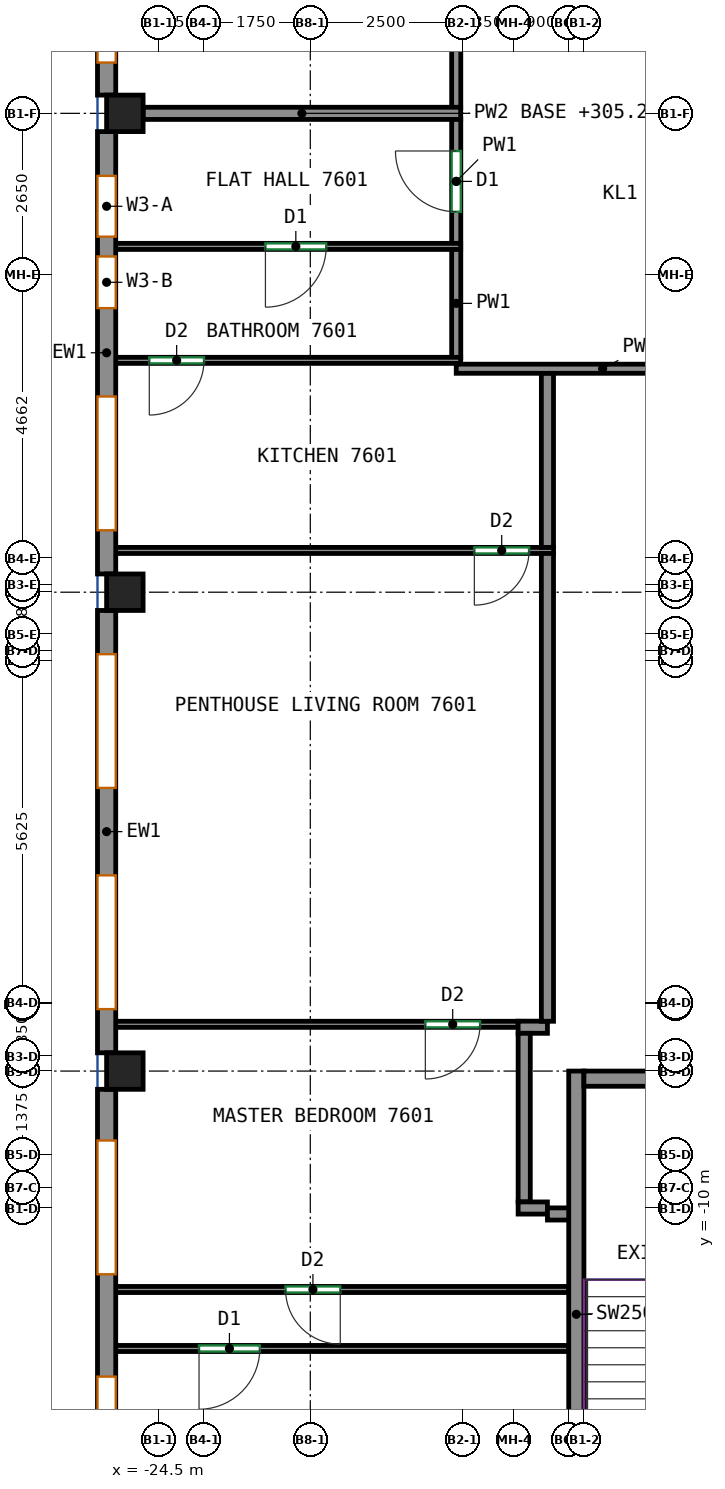
"""IFC4 building model, lengths in metres.
Left out: names, types, materials, properties, quantities, classifications, styles, units other than length and angle.
Written with IfcOpenShell. Run it as: python <this file> out.ifc"""

import sys

from ifc_helpers import new_model, si_unit, direction, frame, frame_2d, origin, origin_2d, place, context, subcontext, project, spatial, rectangle, extrude, source, transform, mapped, element, fill, save


model = new_model("IFC4")
c1 = context("Model", 3, precision=1e-05, world=origin(), true_north=direction((0.0, 1.0)))
c2 = subcontext(c1, "Body", "Model", "MODEL_VIEW")
j1 = project(units=[si_unit("LENGTHUNIT", "METRE"), si_unit("PLANEANGLEUNIT", "RADIAN")], contexts=[c1])
p1 = place(None, origin())
s1 = spatial("IfcSite", under=j1, at=p1, CompositionType="ELEMENT")
p2 = place(p1, origin())
s2 = spatial("IfcBuilding", under=s1, at=p2, CompositionType="ELEMENT")
p3 = place(p2, frame((0.0, 0.0, 305.2)))
s3 = spatial("IfcBuildingStorey", under=s2, at=p3, CompositionType="ELEMENT", Elevation=305.2)
m1 = source(origin(), c2, "Body", "SweptSolid", [
    extrude(rectangle(XDim=0.6, YDim=0.6, at=origin_2d()), origin(), (0.0, 0.0, 1.0), 3.12),
])
for number, where, z_axis, x_axis in (
    (1, (-25.05, -7.75, 0.0), (0.0, 0.0, 1.0), (1.0, 0.0, 0.0)),
    (2, (-25.05, 0.125, 0.0), (0.0, 0.0, 1.0), (1.0, 0.0, 0.0)),
    (3, (-25.05, 8.0, 0.0), (0.0, 0.0, 1.0), (1.0, 0.0, 0.0)),
):
    element("IfcColumn", number, at=place(p3, frame(where, z_axis=z_axis, x_axis=x_axis)), inside=s3, PredefinedType="COLUMN", context=c2, shape_type="MappedRepresentation", body=[
        mapped(m1, transform((0.0, 0.0, 0.0))),
    ])
m2 = source(origin(), c2, "Body", "SweptSolid", [
    extrude(rectangle(XDim=8.0, YDim=0.25, at=frame_2d((4.0, 0.0))), origin(), (0.0, 0.0, 1.0), 3.12),
])
p4 = place(p3, frame((-17.625, -15.75, 0.0), z_axis=(0.0, 0.0, 1.0), x_axis=(0.0, 1.0, 0.0)))
e4 = element("IfcWall", 4, at=p4, inside=s3, PredefinedType="SHEAR", context=c2, shape_type="MappedRepresentation", body=[
    mapped(m2, transform((0.0, 0.0, 0.0))),
])
m3 = source(origin(), c2, "Body", "SweptSolid", [
    extrude(rectangle(XDim=3.7, YDim=0.25, at=frame_2d((1.85, 0.0))), origin(), (0.0, 0.0, 1.0), 3.12),
])
p5 = place(p3, frame((-17.5, -7.875, 0.0), z_axis=(0.0, 0.0, 1.0), x_axis=(1.0, 0.0, 0.0)))
e5 = element("IfcWall", 5, at=p5, inside=s3, PredefinedType="SHEAR", context=c2, shape_type="MappedRepresentation", body=[
    mapped(m3, transform((0.0, 0.0, 0.0))),
])
m4 = source(origin(), c2, "Body", "SweptSolid", [
    extrude(rectangle(XDim=13.082, YDim=0.3, at=frame_2d((6.541, 0.0))), origin(), (0.0, 0.0, 1.0), 3.12),
])
p6 = place(p3, frame((-25.35, 21.382, 0.0), z_axis=(0.0, 0.0, 1.0), x_axis=(0.0, -1.0, 0.0)))
e6 = element("IfcWall", 6, at=p6, inside=s3, PredefinedType="SOLIDWALL", context=c2, shape_type="MappedRepresentation", body=[
    mapped(m4, transform((0.0, 0.0, 0.0))),
])
p7 = place(p6, frame((0.535, 0.0, 0.8)))
e7 = element("IfcOpeningElement", 7, at=p7, cuts=e6, PredefinedType="OPENING", context=c2, shape_type="SweptSolid", body=[
    extrude(rectangle(XDim=2.2, YDim=2.05, at=frame_2d((1.1, 1.025))), frame((0.0, 0.16, 0.0), z_axis=(0.0, -1.0, 0.0), x_axis=(1.0, 0.0, 0.0)), (0.0, 0.0, 1.0), 0.32),
])
p8 = place(p6, frame((3.806, 0.0, 0.8)))
e8 = element("IfcOpeningElement", 8, at=p8, cuts=e6, PredefinedType="OPENING", context=c2, shape_type="SweptSolid", body=[
    extrude(rectangle(XDim=2.2, YDim=2.05, at=frame_2d((1.1, 1.025))), frame((0.0, 0.16, 0.0), z_axis=(0.0, -1.0, 0.0), x_axis=(1.0, 0.0, 0.0)), (0.0, 0.0, 1.0), 0.32),
])
p9 = place(p6, frame((7.076, 0.0, 0.8)))
e9 = element("IfcOpeningElement", 9, at=p9, cuts=e6, PredefinedType="OPENING", context=c2, shape_type="SweptSolid", body=[
    extrude(rectangle(XDim=2.2, YDim=2.05, at=frame_2d((1.1, 1.025))), frame((0.0, 0.16, 0.0), z_axis=(0.0, -1.0, 0.0), x_axis=(1.0, 0.0, 0.0)), (0.0, 0.0, 1.0), 0.32),
])
p10 = place(p6, frame((10.347, 0.0, 0.8)))
e10 = element("IfcOpeningElement", 10, at=p10, cuts=e6, PredefinedType="OPENING", context=c2, shape_type="SweptSolid", body=[
    extrude(rectangle(XDim=2.2, YDim=2.05, at=frame_2d((1.1, 1.025))), frame((0.0, 0.16, 0.0), z_axis=(0.0, -1.0, 0.0), x_axis=(1.0, 0.0, 0.0)), (0.0, 0.0, 1.0), 0.32),
])
m5 = source(origin(), c2, "Body", "SweptSolid", [
    extrude(rectangle(XDim=7.275, YDim=0.3, at=frame_2d((3.637, 0.0))), origin(), (0.0, 0.0, 1.0), 3.12),
])
p11 = place(p3, frame((-25.35, 7.7, 0.0), z_axis=(0.0, 0.0, 1.0), x_axis=(0.0, -1.0, 0.0)))
e11 = element("IfcWall", 11, at=p11, inside=s3, PredefinedType="SOLIDWALL", context=c2, shape_type="MappedRepresentation", body=[
    mapped(m5, transform((0.0, 0.0, 0.0))),
])
p12 = place(p11, frame((0.728, 0.0, 0.8)))
e12 = element("IfcOpeningElement", 12, at=p12, cuts=e11, PredefinedType="OPENING", context=c2, shape_type="SweptSolid", body=[
    extrude(rectangle(XDim=1.0, YDim=2.05, at=frame_2d((0.5, 1.025))), frame((0.0, 0.16, 0.0), z_axis=(0.0, -1.0, 0.0), x_axis=(1.0, 0.0, 0.0)), (0.0, 0.0, 1.0), 0.32),
])
p13 = place(p11, frame((4.356, 0.0, 0.8)))
e13 = element("IfcOpeningElement", 13, at=p13, cuts=e11, PredefinedType="OPENING", context=c2, shape_type="SweptSolid", body=[
    extrude(rectangle(XDim=2.2, YDim=2.05, at=frame_2d((1.1, 1.025))), frame((0.0, 0.16, 0.0), z_axis=(0.0, -1.0, 0.0), x_axis=(1.0, 0.0, 0.0)), (0.0, 0.0, 1.0), 0.32),
])
p14 = place(p11, frame((2.053, 0.0, 0.8)))
e14 = element("IfcOpeningElement", 14, at=p14, cuts=e11, PredefinedType="OPENING", context=c2, shape_type="SweptSolid", body=[
    extrude(rectangle(XDim=0.85, YDim=2.05, at=frame_2d((0.425, 1.025))), frame((0.0, 0.16, 0.0), z_axis=(0.0, -1.0, 0.0), x_axis=(1.0, 0.0, 0.0)), (0.0, 0.0, 1.0), 0.32),
])
p15 = place(p3, frame((-25.35, -0.175, 0.0), z_axis=(0.0, 0.0, 1.0), x_axis=(0.0, -1.0, 0.0)))
e15 = element("IfcWall", 15, at=p15, inside=s3, PredefinedType="SOLIDWALL", context=c2, shape_type="MappedRepresentation", body=[
    mapped(m5, transform((0.0, 0.0, 0.0))),
])
p16 = place(p15, frame((0.719, 0.0, 0.8)))
e16 = element("IfcOpeningElement", 16, at=p16, cuts=e15, PredefinedType="OPENING", context=c2, shape_type="SweptSolid", body=[
    extrude(rectangle(XDim=2.2, YDim=2.05, at=frame_2d((1.1, 1.025))), frame((0.0, 0.16, 0.0), z_axis=(0.0, -1.0, 0.0), x_axis=(1.0, 0.0, 0.0)), (0.0, 0.0, 1.0), 0.32),
])
p17 = place(p15, frame((4.356, 0.0, 0.8)))
e17 = element("IfcOpeningElement", 17, at=p17, cuts=e15, PredefinedType="OPENING", context=c2, shape_type="SweptSolid", body=[
    extrude(rectangle(XDim=2.2, YDim=2.05, at=frame_2d((1.1, 1.025))), frame((0.0, 0.16, 0.0), z_axis=(0.0, -1.0, 0.0), x_axis=(1.0, 0.0, 0.0)), (0.0, 0.0, 1.0), 0.32),
])
m6 = source(origin(), c2, "Body", "SweptSolid", [
    extrude(rectangle(XDim=11.65, YDim=0.3, at=frame_2d((5.825, 0.0))), origin(), (0.0, 0.0, 1.0), 3.12),
])
p18 = place(p3, frame((-25.35, -8.05, 0.0), z_axis=(0.0, 0.0, 1.0), x_axis=(0.0, -1.0, 0.0)))
e18 = element("IfcWall", 18, at=p18, inside=s3, PredefinedType="SOLIDWALL", context=c2, shape_type="MappedRepresentation", body=[
    mapped(m6, transform((0.0, 0.0, 0.0))),
])
p19 = place(p18, frame((0.842, 0.0, 0.8)))
e19 = element("IfcOpeningElement", 19, at=p19, cuts=e18, PredefinedType="OPENING", context=c2, shape_type="SweptSolid", body=[
    extrude(rectangle(XDim=2.2, YDim=2.05, at=frame_2d((1.1, 1.025))), frame((0.0, 0.16, 0.0), z_axis=(0.0, -1.0, 0.0), x_axis=(1.0, 0.0, 0.0)), (0.0, 0.0, 1.0), 0.32),
])
p20 = place(p18, frame((4.725, 0.0, 0.8)))
e20 = element("IfcOpeningElement", 20, at=p20, cuts=e18, PredefinedType="OPENING", context=c2, shape_type="SweptSolid", body=[
    extrude(rectangle(XDim=2.2, YDim=2.05, at=frame_2d((1.1, 1.025))), frame((0.0, 0.16, 0.0), z_axis=(0.0, -1.0, 0.0), x_axis=(1.0, 0.0, 0.0)), (0.0, 0.0, 1.0), 0.32),
])
p21 = place(p18, frame((8.608, 0.0, 0.8)))
e21 = element("IfcOpeningElement", 21, at=p21, cuts=e18, PredefinedType="OPENING", context=c2, shape_type="SweptSolid", body=[
    extrude(rectangle(XDim=2.2, YDim=2.05, at=frame_2d((1.1, 1.025))), frame((0.0, 0.16, 0.0), z_axis=(0.0, -1.0, 0.0), x_axis=(1.0, 0.0, 0.0)), (0.0, 0.0, 1.0), 0.32),
])
p22 = place(p3, frame((-19.6, 3.8, 0.0), z_axis=(0.0, 0.0, 1.0), x_axis=(1.0, 0.0, 0.0)))
e22 = element("IfcWall", 22, at=p22, inside=s3, PredefinedType="PARTITIONING", context=c2, shape_type="SweptSolid", body=[
    extrude(rectangle(XDim=4.815, YDim=0.15, at=frame_2d((2.408, 0.0))), origin(), (0.0, 0.0, 1.0), 3.12),
])
p23 = place(p3, frame((-19.6, 3.978, 0.0), z_axis=(0.0, 0.0, 1.0), x_axis=(0.0, 1.0, 0.0)))
e23 = element("IfcWall", 23, at=p23, inside=s3, PredefinedType="PARTITIONING", context=c2, shape_type="SweptSolid", body=[
    extrude(rectangle(XDim=1.794, YDim=0.15, at=frame_2d((0.897, 0.0))), origin(), (0.0, 0.0, 1.0), 3.12),
])
p24 = place(p3, frame((-19.6, 5.852, 0.0), z_axis=(0.0, 0.0, 1.0), x_axis=(0.0, 1.0, 0.0)))
e24 = element("IfcWall", 24, at=p24, inside=s3, PredefinedType="PARTITIONING", context=c2, shape_type="SweptSolid", body=[
    extrude(rectangle(XDim=2.058, YDim=0.15, at=frame_2d((1.029, 0.0))), origin(), (0.0, 0.0, 1.0), 3.12),
])
p25 = place(p24, frame((0.529, 0.0, 0.0)))
e25 = element("IfcOpeningElement", 25, at=p25, cuts=e24, PredefinedType="OPENING", context=c2, shape_type="SweptSolid", body=[
    extrude(rectangle(XDim=1.0, YDim=2.1, at=frame_2d((0.5, 1.05))), frame((0.0, 0.085, 0.0), z_axis=(0.0, -1.0, 0.0), x_axis=(1.0, 0.0, 0.0)), (0.0, 0.0, 1.0), 0.17),
])
p26 = place(p3, frame((-19.6, 8.09, 0.0), z_axis=(0.0, 0.0, 1.0), x_axis=(0.0, 1.0, 0.0)))
e26 = element("IfcWall", 26, at=p26, inside=s3, PredefinedType="PARTITIONING", context=c2, shape_type="SweptSolid", body=[
    extrude(rectangle(XDim=15.635, YDim=0.15, at=frame_2d((7.817, 0.0))), origin(), (0.0, 0.0, 1.0), 3.12),
])
p27 = place(p3, frame((-17.75, -12.312, 0.0), z_axis=(0.0, 0.0, 1.0), x_axis=(-1.0, 0.0, 0.0)))
e27 = element("IfcWall", 27, at=p27, inside=s3, PredefinedType="PARTITIONING", context=c2, shape_type="SweptSolid", body=[
    extrude(rectangle(XDim=7.5, YDim=0.1, at=frame_2d((3.75, 0.0))), origin(), (0.0, 0.0, 1.0), 3.12),
])
p28 = place(p27, frame((5.08, 0.0, 0.0)))
e28 = element("IfcOpeningElement", 28, at=p28, cuts=e27, PredefinedType="OPENING", context=c2, shape_type="SweptSolid", body=[
    extrude(rectangle(XDim=1.0, YDim=2.1, at=frame_2d((0.5, 1.05))), frame((0.0, 0.06, 0.0), z_axis=(0.0, -1.0, 0.0), x_axis=(1.0, 0.0, 0.0)), (0.0, 0.0, 1.0), 0.12),
])
p29 = place(p3, frame((-17.75, -11.342, 0.0), z_axis=(0.0, 0.0, 1.0), x_axis=(-1.0, 0.0, 0.0)))
e29 = element("IfcWall", 29, at=p29, inside=s3, PredefinedType="PARTITIONING", context=c2, shape_type="SweptSolid", body=[
    extrude(rectangle(XDim=7.5, YDim=0.1, at=frame_2d((3.75, 0.0))), origin(), (0.0, 0.0, 1.0), 3.12),
])
p30 = place(p29, frame((3.757, 0.0, 0.0)))
e30 = element("IfcOpeningElement", 30, at=p30, cuts=e29, PredefinedType="OPENING", context=c2, shape_type="SweptSolid", body=[
    extrude(rectangle(XDim=0.9, YDim=2.1, at=frame_2d((0.45, 1.05))), frame((0.0, 0.06, 0.0), z_axis=(0.0, -1.0, 0.0), x_axis=(1.0, 0.0, 0.0)), (0.0, 0.0, 1.0), 0.12),
])
p31 = place(p3, frame((-18.582, -6.981, 0.0), z_axis=(0.0, 0.0, 1.0), x_axis=(-1.0, 0.0, 0.0)))
e31 = element("IfcWall", 31, at=p31, inside=s3, PredefinedType="PARTITIONING", context=c2, shape_type="SweptSolid", body=[
    extrude(rectangle(XDim=6.668, YDim=0.1, at=frame_2d((3.334, 0.0))), origin(), (0.0, 0.0, 1.0), 3.12),
])
p32 = place(p31, frame((0.626, 0.0, 0.0)))
e32 = element("IfcOpeningElement", 32, at=p32, cuts=e31, PredefinedType="OPENING", context=c2, shape_type="SweptSolid", body=[
    extrude(rectangle(XDim=0.9, YDim=2.1, at=frame_2d((0.45, 1.05))), frame((0.0, 0.06, 0.0), z_axis=(0.0, -1.0, 0.0), x_axis=(1.0, 0.0, 0.0)), (0.0, 0.0, 1.0), 0.12),
])
p33 = place(p3, frame((-18.582, -7.029, 0.0), z_axis=(0.0, 0.0, 1.0), x_axis=(1.0, 0.0, 0.0)))
e33 = element("IfcWall", 33, at=p33, inside=s3, PredefinedType="PARTITIONING", context=c2, shape_type="SweptSolid", body=[
    extrude(rectangle(XDim=0.482, YDim=0.2, at=frame_2d((0.241, 0.0))), origin(), (0.0, 0.0, 1.0), 3.12),
])
p34 = place(p3, frame((-18.482, -9.902, 0.0), z_axis=(0.0, 0.0, 1.0), x_axis=(0.0, 1.0, 0.0)))
e34 = element("IfcWall", 34, at=p34, inside=s3, PredefinedType="PARTITIONING", context=c2, shape_type="SweptSolid", body=[
    extrude(rectangle(XDim=2.773, YDim=0.2, at=frame_2d((1.387, 0.0))), origin(), (0.0, 0.0, 1.0), 3.12),
])
p35 = place(p3, frame((-18.1, -10.002, 0.0), z_axis=(0.0, 0.0, 1.0), x_axis=(-1.0, 0.0, 0.0)))
e35 = element("IfcWall", 35, at=p35, inside=s3, PredefinedType="PARTITIONING", context=c2, shape_type="SweptSolid", body=[
    extrude(rectangle(XDim=0.482, YDim=0.2, at=frame_2d((0.241, 0.0))), origin(), (0.0, 0.0, 1.0), 3.12),
])
p36 = place(p3, frame((-17.7, -10.1, 0.0), z_axis=(0.0, 0.0, 1.0), x_axis=(-1.0, 0.0, 0.0)))
e36 = element("IfcWall", 36, at=p36, inside=s3, PredefinedType="PARTITIONING", context=c2, shape_type="SweptSolid", body=[
    extrude(rectangle(XDim=0.4, YDim=0.2, at=frame_2d((0.2, 0.0))), origin(), (0.0, 0.0, 1.0), 3.12),
])
p37 = place(p3, frame((-18.0, 0.812, 0.0), z_axis=(0.0, 0.0, 1.0), x_axis=(-1.0, 0.0, 0.0)))
e37 = element("IfcWall", 37, at=p37, inside=s3, PredefinedType="PARTITIONING", context=c2, shape_type="SweptSolid", body=[
    extrude(rectangle(XDim=7.25, YDim=0.1, at=frame_2d((3.625, 0.0))), origin(), (0.0, 0.0, 1.0), 3.12),
])
p38 = place(p37, frame((0.402, 0.0, 0.0)))
e38 = element("IfcOpeningElement", 38, at=p38, cuts=e37, PredefinedType="OPENING", context=c2, shape_type="SweptSolid", body=[
    extrude(rectangle(XDim=0.9, YDim=2.1, at=frame_2d((0.45, 1.05))), frame((0.0, 0.06, 0.0), z_axis=(0.0, -1.0, 0.0), x_axis=(1.0, 0.0, 0.0)), (0.0, 0.0, 1.0), 0.12),
])
p39 = place(p3, frame((-18.1, -6.931, 0.0), z_axis=(0.0, 0.0, 1.0), x_axis=(0.0, 1.0, 0.0)))
e39 = element("IfcWall", 39, at=p39, inside=s3, PredefinedType="PARTITIONING", context=c2, shape_type="SweptSolid", body=[
    extrude(rectangle(XDim=7.693, YDim=0.2, at=frame_2d((3.846, 0.0))), origin(), (0.0, 0.0, 1.0), 3.12),
])
p40 = place(p3, frame((-19.527, 3.938, 0.0), z_axis=(0.0, 0.0, 1.0), x_axis=(-1.0, 0.0, 0.0)))
e40 = element("IfcWall", 40, at=p40, inside=s3, PredefinedType="PARTITIONING", context=c2, shape_type="SweptSolid", body=[
    extrude(rectangle(XDim=5.723, YDim=0.1, at=frame_2d((2.861, 0.0))), origin(), (0.0, 0.0, 1.0), 3.12),
])
p41 = place(p40, frame((4.221, 0.0, 0.0)))
e41 = element("IfcOpeningElement", 41, at=p41, cuts=e40, PredefinedType="OPENING", context=c2, shape_type="SweptSolid", body=[
    extrude(rectangle(XDim=0.9, YDim=2.1, at=frame_2d((0.45, 1.05))), frame((0.0, 0.06, 0.0), z_axis=(0.0, -1.0, 0.0), x_axis=(1.0, 0.0, 0.0)), (0.0, 0.0, 1.0), 0.12),
])
p42 = place(p3, frame((-18.1, 0.862, 0.0), z_axis=(0.0, 0.0, 1.0), x_axis=(0.0, 1.0, 0.0)))
e42 = element("IfcWall", 42, at=p42, inside=s3, PredefinedType="PARTITIONING", context=c2, shape_type="SweptSolid", body=[
    extrude(rectangle(XDim=2.861, YDim=0.2, at=frame_2d((1.43, 0.0))), origin(), (0.0, 0.0, 1.0), 3.12),
])
p43 = place(p3, frame((-19.527, 5.812, 0.0), z_axis=(0.0, 0.0, 1.0), x_axis=(-1.0, 0.0, 0.0)))
e43 = element("IfcWall", 43, at=p43, inside=s3, PredefinedType="PARTITIONING", context=c2, shape_type="SweptSolid", body=[
    extrude(rectangle(XDim=5.723, YDim=0.1, at=frame_2d((2.861, 0.0))), origin(), (0.0, 0.0, 1.0), 3.12),
])
p44 = place(p43, frame((2.211, 0.0, 0.0)))
e44 = element("IfcOpeningElement", 44, at=p44, cuts=e43, PredefinedType="OPENING", context=c2, shape_type="SweptSolid", body=[
    extrude(rectangle(XDim=1.0, YDim=2.1, at=frame_2d((0.5, 1.05))), frame((0.0, 0.06, 0.0), z_axis=(0.0, -1.0, 0.0), x_axis=(1.0, 0.0, 0.0)), (0.0, 0.0, 1.0), 0.12),
])
p45 = place(p3, frame((-19.527, 8.0, 0.0), z_axis=(0.0, 0.0, 1.0), x_axis=(-1.0, 0.0, 0.0)))
e45 = element("IfcWall", 45, at=p45, inside=s3, PredefinedType="PARTITIONING", context=c2, shape_type="SweptSolid", body=[
    extrude(rectangle(XDim=5.223, YDim=0.2, at=frame_2d((2.611, 0.0))), origin(), (0.0, 0.0, 1.0), 2.57),
])
p46 = place(p10, origin())
e46 = element("IfcWindow", 46, at=p46, inside=s3, PartitioningType="SINGLE_PANEL", PredefinedType="WINDOW", context=c2, shape_type="SweptSolid", body=[
    extrude(rectangle(XDim=2.2, YDim=2.05, at=frame_2d((1.1, 1.025))), frame((0.0, 0.03, 0.0), z_axis=(0.0, -1.0, 0.0), x_axis=(1.0, 0.0, 0.0)), (0.0, 0.0, 1.0), 0.06),
])
fill(e10, e46)
p47 = place(p12, origin())
e47 = element("IfcWindow", 47, at=p47, inside=s3, PartitioningType="SINGLE_PANEL", PredefinedType="WINDOW", context=c2, shape_type="SweptSolid", body=[
    extrude(rectangle(XDim=1.0, YDim=2.05, at=frame_2d((0.5, 1.025))), frame((0.0, 0.03, 0.0), z_axis=(0.0, -1.0, 0.0), x_axis=(1.0, 0.0, 0.0)), (0.0, 0.0, 1.0), 0.06),
])
fill(e12, e47)
p48 = place(p13, origin())
e48 = element("IfcWindow", 48, at=p48, inside=s3, PartitioningType="SINGLE_PANEL", PredefinedType="WINDOW", context=c2, shape_type="SweptSolid", body=[
    extrude(rectangle(XDim=2.2, YDim=2.05, at=frame_2d((1.1, 1.025))), frame((0.0, 0.03, 0.0), z_axis=(0.0, -1.0, 0.0), x_axis=(1.0, 0.0, 0.0)), (0.0, 0.0, 1.0), 0.06),
])
fill(e13, e48)
p49 = place(p16, origin())
e49 = element("IfcWindow", 49, at=p49, inside=s3, PartitioningType="SINGLE_PANEL", PredefinedType="WINDOW", context=c2, shape_type="SweptSolid", body=[
    extrude(rectangle(XDim=2.2, YDim=2.05, at=frame_2d((1.1, 1.025))), frame((0.0, 0.03, 0.0), z_axis=(0.0, -1.0, 0.0), x_axis=(1.0, 0.0, 0.0)), (0.0, 0.0, 1.0), 0.06),
])
fill(e16, e49)
p50 = place(p17, origin())
e50 = element("IfcWindow", 50, at=p50, inside=s3, PartitioningType="SINGLE_PANEL", PredefinedType="WINDOW", context=c2, shape_type="SweptSolid", body=[
    extrude(rectangle(XDim=2.2, YDim=2.05, at=frame_2d((1.1, 1.025))), frame((0.0, 0.03, 0.0), z_axis=(0.0, -1.0, 0.0), x_axis=(1.0, 0.0, 0.0)), (0.0, 0.0, 1.0), 0.06),
])
fill(e17, e50)
p51 = place(p19, origin())
e51 = element("IfcWindow", 51, at=p51, inside=s3, PartitioningType="SINGLE_PANEL", PredefinedType="WINDOW", context=c2, shape_type="SweptSolid", body=[
    extrude(rectangle(XDim=2.2, YDim=2.05, at=frame_2d((1.1, 1.025))), frame((0.0, 0.03, 0.0), z_axis=(0.0, -1.0, 0.0), x_axis=(1.0, 0.0, 0.0)), (0.0, 0.0, 1.0), 0.06),
])
fill(e19, e51)
p52 = place(p20, origin())
e52 = element("IfcWindow", 52, at=p52, inside=s3, PartitioningType="SINGLE_PANEL", PredefinedType="WINDOW", context=c2, shape_type="SweptSolid", body=[
    extrude(rectangle(XDim=2.2, YDim=2.05, at=frame_2d((1.1, 1.025))), frame((0.0, 0.03, 0.0), z_axis=(0.0, -1.0, 0.0), x_axis=(1.0, 0.0, 0.0)), (0.0, 0.0, 1.0), 0.06),
])
fill(e20, e52)
p53 = place(p28, origin())
e53 = element("IfcDoor", 53, at=p53, inside=s3, OperationType="SINGLE_SWING_RIGHT", PredefinedType="DOOR", context=c2, shape_type="SweptSolid", body=[
    extrude(rectangle(XDim=1.0, YDim=2.1, at=frame_2d((0.5, 1.05))), frame((0.0, 0.025, 0.0), z_axis=(0.0, -1.0, 0.0), x_axis=(1.0, 0.0, 0.0)), (0.0, 0.0, 1.0), 0.05),
])
fill(e28, e53)
p54 = place(p30, origin())
e54 = element("IfcDoor", 54, at=p54, inside=s3, OperationType="SINGLE_SWING_LEFT", PredefinedType="DOOR", context=c2, shape_type="SweptSolid", body=[
    extrude(rectangle(XDim=0.9, YDim=2.1, at=frame_2d((0.45, 1.05))), frame((0.0, 0.025, 0.0), z_axis=(0.0, -1.0, 0.0), x_axis=(1.0, 0.0, 0.0)), (0.0, 0.0, 1.0), 0.05),
])
fill(e30, e54)
p55 = place(p32, origin())
e55 = element("IfcDoor", 55, at=p55, inside=s3, OperationType="SINGLE_SWING_RIGHT", PredefinedType="DOOR", context=c2, shape_type="SweptSolid", body=[
    extrude(rectangle(XDim=0.9, YDim=2.1, at=frame_2d((0.45, 1.05))), frame((0.0, 0.025, 0.0), z_axis=(0.0, -1.0, 0.0), x_axis=(1.0, 0.0, 0.0)), (0.0, 0.0, 1.0), 0.05),
])
fill(e32, e55)
p56 = place(p38, origin())
e56 = element("IfcDoor", 56, at=p56, inside=s3, OperationType="SINGLE_SWING_RIGHT", PredefinedType="DOOR", context=c2, shape_type="SweptSolid", body=[
    extrude(rectangle(XDim=0.9, YDim=2.1, at=frame_2d((0.45, 1.05))), frame((0.0, 0.025, 0.0), z_axis=(0.0, -1.0, 0.0), x_axis=(1.0, 0.0, 0.0)), (0.0, 0.0, 1.0), 0.05),
])
fill(e38, e56)
p57 = place(p41, origin())
e57 = element("IfcDoor", 57, at=p57, inside=s3, OperationType="SINGLE_SWING_RIGHT", PredefinedType="DOOR", context=c2, shape_type="SweptSolid", body=[
    extrude(rectangle(XDim=0.9, YDim=2.1, at=frame_2d((0.45, 1.05))), frame((0.0, 0.025, 0.0), z_axis=(0.0, -1.0, 0.0), x_axis=(1.0, 0.0, 0.0)), (0.0, 0.0, 1.0), 0.05),
])
fill(e41, e57)
p58 = place(p44, origin())
e58 = element("IfcDoor", 58, at=p58, inside=s3, OperationType="SINGLE_SWING_RIGHT", PredefinedType="DOOR", context=c2, shape_type="SweptSolid", body=[
    extrude(rectangle(XDim=1.0, YDim=2.1, at=frame_2d((0.5, 1.05))), frame((0.0, 0.025, 0.0), z_axis=(0.0, -1.0, 0.0), x_axis=(1.0, 0.0, 0.0)), (0.0, 0.0, 1.0), 0.05),
])
fill(e44, e58)
p59 = place(p25, origin())
e59 = element("IfcDoor", 59, at=p59, inside=s3, OperationType="SINGLE_SWING_RIGHT", PredefinedType="DOOR", context=c2, shape_type="SweptSolid", body=[
    extrude(rectangle(XDim=1.0, YDim=2.1, at=frame_2d((0.5, 1.05))), frame((0.0, 0.025, 0.0), z_axis=(0.0, -1.0, 0.0), x_axis=(1.0, 0.0, 0.0)), (0.0, 0.0, 1.0), 0.05),
])
fill(e25, e59)
p60 = place(p14, origin())
e60 = element("IfcWindow", 60, at=p60, inside=s3, PartitioningType="SINGLE_PANEL", PredefinedType="WINDOW", context=c2, shape_type="SweptSolid", body=[
    extrude(rectangle(XDim=0.85, YDim=2.05, at=frame_2d((0.425, 1.025))), frame((0.0, 0.03, 0.0), z_axis=(0.0, -1.0, 0.0), x_axis=(1.0, 0.0, 0.0)), (0.0, 0.0, 1.0), 0.06),
])
fill(e14, e60)
save(model, sys.argv[1])
